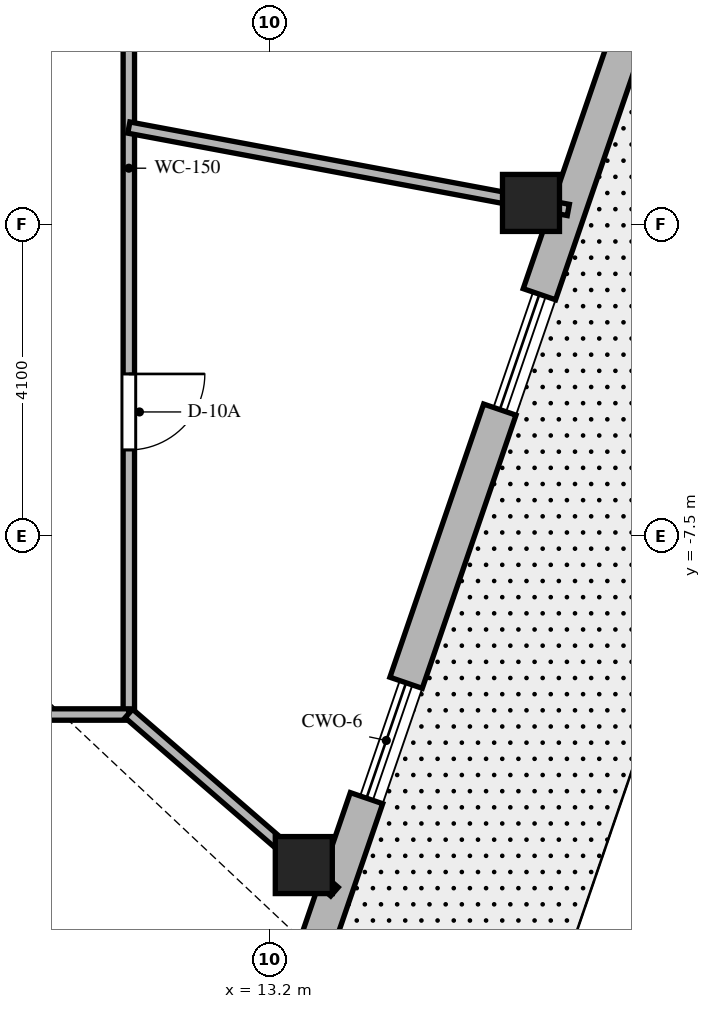
"""IFC4 building model, lengths in metres.
Left out: names, types, materials, properties, quantities, classifications, styles, units other than length and angle.
Written with IfcOpenShell. Run it as: python <this file> out.ifc"""

import sys

from ifc_helpers import new_model, si_unit, direction, frame, frame_2d, origin, origin_2d, place, context, subcontext, project, spatial, rectangle, extrude, element, fill, save


model = new_model("IFC4")
c1 = context("Model", 3, precision=1e-05, world=origin(), true_north=direction((0.0, 1.0)))
c2 = subcontext(c1, "Body", "Model", "MODEL_VIEW")
j1 = project(units=[si_unit("LENGTHUNIT", "METRE"), si_unit("PLANEANGLEUNIT", "RADIAN")], contexts=[c1])
p1 = place(None, origin())
s1 = spatial("IfcSite", under=j1, at=p1, CompositionType="ELEMENT")
p2 = place(p1, origin())
s2 = spatial("IfcBuilding", under=s1, at=p2, CompositionType="ELEMENT")
p3 = place(p2, frame((0.0, 0.0, 305.4)))
s3 = spatial("IfcBuildingStorey", under=s2, at=p3, CompositionType="ELEMENT", Elevation=305.4)
for number, where, z_axis, x_axis in (
    (1, (13.652, -11.831, 0.0), (0.0, 0.0, 1.0), (1.0, 0.0, 0.0)),
    (2, (16.641, -3.119, 0.0), (0.0, 0.0, 1.0), (1.0, 0.0, 0.0)),
):
    element("IfcColumn", number, at=place(p3, frame(where, z_axis=z_axis, x_axis=x_axis)), inside=s3, PredefinedType="COLUMN", context=c2, shape_type="SweptSolid", body=[
        extrude(rectangle(XDim=0.75, YDim=0.75, at=origin_2d()), origin(), (0.0, 0.0, 1.0), 5.0),
    ])
p4 = place(p3, frame((13.131, -14.873, 0.0), z_axis=(0.0, 0.0, 1.0), x_axis=(0.324498911717, 0.945886069405, 0.0)))
e3 = element("IfcWall", 3, at=p4, inside=s3, PredefinedType="SOLIDWALL", context=c2, shape_type="SweptSolid", body=[
    extrude(rectangle(XDim=4.147, YDim=0.45, at=frame_2d((2.073, 0.0))), origin(), (0.0, 0.0, 1.0), 4.68),
])
p5 = place(p3, frame((14.998, -9.433, 0.0), z_axis=(0.0, 0.0, 1.0), x_axis=(0.324503351443, 0.945884546286, 0.0)))
e4 = element("IfcWall", 4, at=p5, inside=s3, PredefinedType="SOLIDWALL", context=c2, shape_type="SweptSolid", body=[
    extrude(rectangle(XDim=3.8, YDim=0.45, at=frame_2d((1.9, 0.0))), origin(), (0.0, 0.0, 1.0), 4.68),
])
p6 = place(p3, frame((16.752, -4.32, 0.0), z_axis=(0.0, 0.0, 1.0), x_axis=(0.324516563827, 0.945880013428, 0.0)))
e5 = element("IfcWall", 5, at=p6, inside=s3, PredefinedType="SOLIDWALL", context=c2, shape_type="SweptSolid", body=[
    extrude(rectangle(XDim=4.156, YDim=0.45, at=frame_2d((2.078, 0.0))), origin(), (0.0, 0.0, 1.0), 4.68),
])
p7 = place(p3, frame((11.35, 9.85, 0.0), z_axis=(0.0, 0.0, 1.0), x_axis=(0.0, -1.0, 0.0)))
e6 = element("IfcWall", 6, at=p7, inside=s3, PredefinedType="PARTITIONING", context=c2, shape_type="SweptSolid", body=[
    extrude(rectangle(XDim=19.7, YDim=0.15, at=frame_2d((9.85, 0.0))), origin(), (0.0, 0.0, 1.0), 2.87),
])
p8 = place(p7, frame((2.938, 0.0, 0.0)))
e7 = element("IfcOpeningElement", 7, at=p8, cuts=e6, PredefinedType="OPENING", context=c2, shape_type="SweptSolid", body=[
    extrude(rectangle(XDim=1.0, YDim=2.03, at=frame_2d((0.5, 1.015))), frame((0.0, 0.085, 0.0), z_axis=(0.0, -1.0, 0.0), x_axis=(1.0, 0.0, 0.0)), (0.0, 0.0, 1.0), 0.17),
])
p9 = place(p7, frame((15.219, 0.0, 0.0)))
e8 = element("IfcOpeningElement", 8, at=p9, cuts=e6, PredefinedType="OPENING", context=c2, shape_type="SweptSolid", body=[
    extrude(rectangle(XDim=1.0, YDim=2.03, at=frame_2d((0.5, 1.015))), frame((0.0, 0.085, 0.0), z_axis=(0.0, -1.0, 0.0), x_axis=(1.0, 0.0, 0.0)), (0.0, 0.0, 1.0), 0.17),
])
p10 = place(p7, frame((8.805, 0.0, 0.0)))
e9 = element("IfcOpeningElement", 9, at=p10, cuts=e6, PredefinedType="OPENING", context=c2, shape_type="SweptSolid", body=[
    extrude(rectangle(XDim=1.0, YDim=2.03, at=frame_2d((0.5, 1.015))), frame((0.0, 0.085, 0.0), z_axis=(0.0, -1.0, 0.0), x_axis=(1.0, 0.0, 0.0)), (0.0, 0.0, 1.0), 0.17),
])
p11 = place(p3, frame((11.35, -9.85, 0.0), z_axis=(0.0, 0.0, 1.0), x_axis=(-1.0, 0.0, 0.0)))
e10 = element("IfcWall", 10, at=p11, inside=s3, PredefinedType="PARTITIONING", context=c2, shape_type="SweptSolid", body=[
    extrude(rectangle(XDim=22.7, YDim=0.15, at=frame_2d((11.35, 0.0))), origin(), (0.0, 0.0, 1.0), 2.87),
])
p12 = place(p11, frame((17.249, 0.0, 0.0)))
e11 = element("IfcOpeningElement", 11, at=p12, cuts=e10, PredefinedType="OPENING", context=c2, shape_type="SweptSolid", body=[
    extrude(rectangle(XDim=1.0, YDim=2.03, at=frame_2d((0.5, 1.015))), frame((0.0, 0.085, 0.0), z_axis=(0.0, -1.0, 0.0), x_axis=(1.0, 0.0, 0.0)), (0.0, 0.0, 1.0), 0.17),
])
p13 = place(p11, frame((10.441, 0.0, 0.0)))
e12 = element("IfcOpeningElement", 12, at=p13, cuts=e10, PredefinedType="OPENING", context=c2, shape_type="SweptSolid", body=[
    extrude(rectangle(XDim=1.0, YDim=2.03, at=frame_2d((0.5, 1.015))), frame((0.0, 0.085, 0.0), z_axis=(0.0, -1.0, 0.0), x_axis=(1.0, 0.0, 0.0)), (0.0, 0.0, 1.0), 0.17),
])
p14 = place(p11, frame((3.454, 0.0, 0.0)))
e13 = element("IfcOpeningElement", 13, at=p14, cuts=e10, PredefinedType="OPENING", context=c2, shape_type="SweptSolid", body=[
    extrude(rectangle(XDim=1.0, YDim=2.03, at=frame_2d((0.5, 1.015))), frame((0.0, 0.085, 0.0), z_axis=(0.0, -1.0, 0.0), x_axis=(1.0, 0.0, 0.0)), (0.0, 0.0, 1.0), 0.17),
])
p15 = place(p3, frame((11.35, -9.836, 0.0), z_axis=(0.0, 0.0, 1.0), x_axis=(0.755716089778, -0.65489937521, 0.0)))
e14 = element("IfcWall", 14, at=p15, inside=s3, PredefinedType="PARTITIONING", context=c2, shape_type="SweptSolid", body=[
    extrude(rectangle(XDim=3.579, YDim=0.15, at=frame_2d((1.79, 0.0))), origin(), (0.0, 0.0, 1.0), 2.87),
])
p16 = place(p3, frame((11.35, -2.127, 0.0), z_axis=(0.0, 0.0, 1.0), x_axis=(0.982876415115, -0.184265983326, 0.0)))
e15 = element("IfcWall", 15, at=p16, inside=s3, PredefinedType="PARTITIONING", context=c2, shape_type="SweptSolid", body=[
    extrude(rectangle(XDim=5.883, YDim=0.15, at=frame_2d((2.941, 0.0))), origin(), (0.0, 0.0, 1.0), 2.87),
])
p17 = place(p9, origin())
e16 = element("IfcDoor", 16, at=p17, inside=s3, OperationType="SINGLE_SWING_LEFT", PredefinedType="DOOR", context=c2, shape_type="SweptSolid", body=[
    extrude(rectangle(XDim=1.0, YDim=2.03, at=frame_2d((0.5, 1.015))), frame((0.0, 0.025, 0.0), z_axis=(0.0, -1.0, 0.0), x_axis=(1.0, 0.0, 0.0)), (0.0, 0.0, 1.0), 0.05),
])
fill(e8, e16)
save(model, sys.argv[1])
